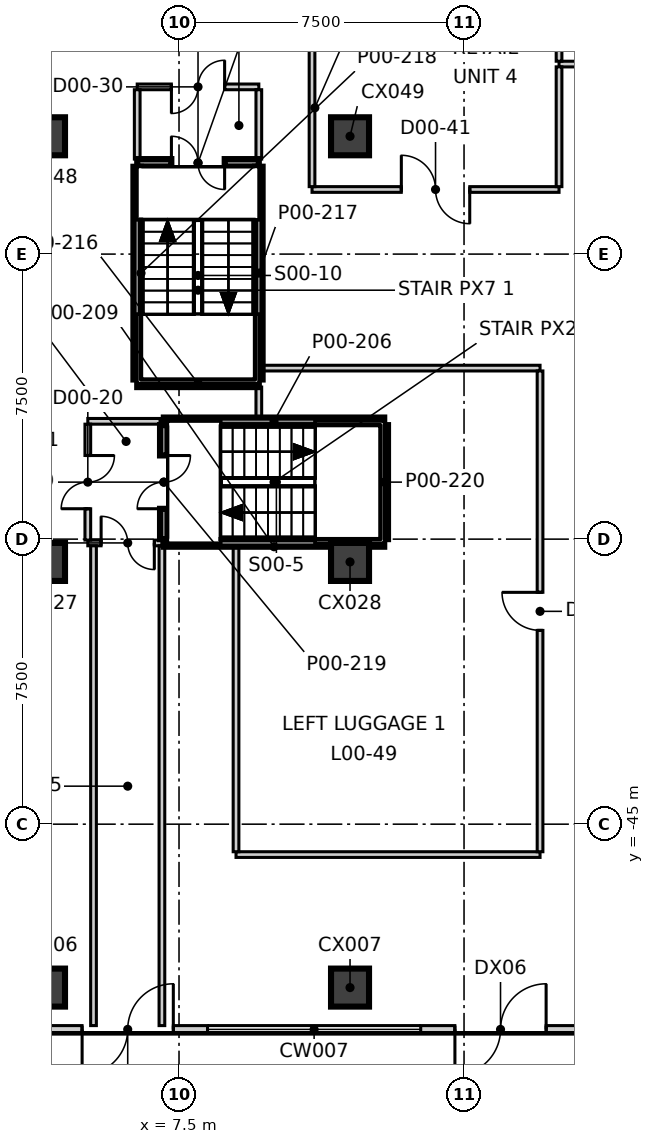
"""IFC4 building model, lengths in metres.
Left out: names, types, materials, properties, quantities, classifications, styles, units other than length and angle.
Written with IfcOpenShell. Run it as: python <this file> out.ifc"""

import sys

from ifc_helpers import new_model, si_unit, direction, frame, frame_2d, origin, origin_2d, place, context, subcontext, project, spatial, rectangle, extrude, element, fill, save


model = new_model("IFC4")
c1 = context("Model", 3, precision=1e-05, world=origin(), true_north=direction((0.0, 1.0)))
c2 = subcontext(c1, "Body", "Model", "MODEL_VIEW")
j1 = project(units=[si_unit("LENGTHUNIT", "METRE"), si_unit("PLANEANGLEUNIT", "RADIAN")], contexts=[c1])
p1 = place(None, origin())
s1 = spatial("IfcSite", under=j1, at=p1, CompositionType="ELEMENT")
p2 = place(p1, origin())
s2 = spatial("IfcBuilding", under=s1, at=p2, CompositionType="ELEMENT")
p3 = place(p2, origin())
s3 = spatial("IfcBuildingStorey", under=s2, at=p3, CompositionType="ELEMENT", Elevation=0.0)
for number, where, z_axis, x_axis in (
    (1, (4.0, -49.3, -0.4), (0.0, 0.0, 1.0), (1.0, 0.0, 0.0)),
    (2, (12.0, -49.3, -0.4), (0.0, 0.0, 1.0), (1.0, 0.0, 0.0)),
    (3, (4.0, -38.1, -0.4), (0.0, 0.0, 1.0), (1.0, 0.0, 0.0)),
    (4, (12.0, -38.1, -0.4), (0.0, 0.0, 1.0), (1.0, 0.0, 0.0)),
    (5, (4.0, -26.9, -0.4), (0.0, 0.0, 1.0), (1.0, 0.0, 0.0)),
    (6, (12.0, -26.9, -0.4), (0.0, 0.0, 1.0), (1.0, 0.0, 0.0)),
):
    element("IfcColumn", number, at=place(p3, frame(where, z_axis=z_axis, x_axis=x_axis)), inside=s3, PredefinedType="COLUMN", context=c2, shape_type="SweptSolid", body=[
        extrude(rectangle(XDim=1.0, YDim=1.0, at=origin_2d()), origin(), (0.0, 0.0, 1.0), 8.5),
    ])
p4 = place(p3, frame((4.05, -50.4, 0.0), z_axis=(0.0, 0.0, 1.0), x_axis=(1.0, 0.0, 0.0)))
e7 = element("IfcWall", 7, at=p4, inside=s3, PredefinedType="ELEMENTEDWALL", context=c2, shape_type="SweptSolid", body=[
    extrude(rectangle(XDim=4.2, YDim=0.2, at=frame_2d((2.1, 0.0))), origin(), (0.0, 0.0, 1.0), 8.1),
])
p5 = place(p4, frame((0.9, 0.0, 0.0)))
e8 = element("IfcOpeningElement", 8, at=p5, cuts=e7, PredefinedType="OPENING", context=c2, shape_type="SweptSolid", body=[
    extrude(rectangle(XDim=2.4, YDim=3.2, at=frame_2d((1.2, 1.6))), frame((0.0, 0.11, 0.0), z_axis=(0.0, -1.0, 0.0), x_axis=(1.0, 0.0, 0.0)), (0.0, 0.0, 1.0), 0.22),
])
p6 = place(p3, frame((13.86, -50.4, 0.0), z_axis=(0.0, 0.0, 1.0), x_axis=(1.0, 0.0, 0.0)))
e9 = element("IfcWall", 9, at=p6, inside=s3, PredefinedType="ELEMENTEDWALL", context=c2, shape_type="SweptSolid", body=[
    extrude(rectangle(XDim=4.2, YDim=0.2, at=frame_2d((2.1, 0.0))), origin(), (0.0, 0.0, 1.0), 8.1),
])
p7 = place(p6, frame((0.9, 0.0, 0.0)))
e10 = element("IfcOpeningElement", 10, at=p7, cuts=e9, PredefinedType="OPENING", context=c2, shape_type="SweptSolid", body=[
    extrude(rectangle(XDim=2.4, YDim=3.2, at=frame_2d((1.2, 1.6))), frame((0.0, 0.11, 0.0), z_axis=(0.0, -1.0, 0.0), x_axis=(1.0, 0.0, 0.0)), (0.0, 0.0, 1.0), 0.22),
])
p8 = place(p3, frame((6.4, -25.6, 0.0), z_axis=(0.0, 0.0, 1.0), x_axis=(1.0, 0.0, 0.0)))
e11 = element("IfcWall", 11, at=p8, inside=s3, PredefinedType="PARTITIONING", context=c2, shape_type="SweptSolid", body=[
    extrude(rectangle(XDim=3.2, YDim=0.15, at=frame_2d((1.6, 0.0))), origin(), (0.0, 0.0, 1.0), 8.1),
])
p9 = place(p8, frame((0.9, 0.0, 0.0)))
e12 = element("IfcOpeningElement", 12, at=p9, cuts=e11, PredefinedType="OPENING", context=c2, shape_type="SweptSolid", body=[
    extrude(rectangle(XDim=1.4, YDim=2.1, at=frame_2d((0.7, 1.05))), frame((0.0, 0.085, 0.0), z_axis=(0.0, -1.0, 0.0), x_axis=(1.0, 0.0, 0.0)), (0.0, 0.0, 1.0), 0.17),
])
p10 = place(p3, frame((5.1, -34.4, 0.0), z_axis=(0.0, 0.0, 1.0), x_axis=(1.0, 0.0, 0.0)))
e13 = element("IfcWall", 13, at=p10, inside=s3, PredefinedType="PARTITIONING", context=c2, shape_type="SweptSolid", body=[
    extrude(rectangle(XDim=1.9, YDim=0.15, at=frame_2d((0.95, 0.0))), origin(), (0.0, 0.0, 1.0), 8.1),
])
p11 = place(p3, frame((5.1, -37.6, 0.0), z_axis=(0.0, 0.0, 1.0), x_axis=(1.0, 0.0, 0.0)))
e14 = element("IfcWall", 14, at=p11, inside=s3, PredefinedType="PARTITIONING", context=c2, shape_type="SweptSolid", body=[
    extrude(rectangle(XDim=1.95, YDim=0.15, at=frame_2d((0.975, 0.0))), origin(), (0.0, 0.0, 1.0), 8.1),
])
p12 = place(p11, frame((0.35, 0.0, 0.0)))
e15 = element("IfcOpeningElement", 15, at=p12, cuts=e14, PredefinedType="OPENING", context=c2, shape_type="SweptSolid", body=[
    extrude(rectangle(XDim=1.4, YDim=2.1, at=frame_2d((0.7, 1.05))), frame((0.0, 0.085, 0.0), z_axis=(0.0, -1.0, 0.0), x_axis=(1.0, 0.0, 0.0)), (0.0, 0.0, 1.0), 0.17),
])
p13 = place(p3, frame((5.1, -37.525, 0.0), z_axis=(0.0, 0.0, 1.0), x_axis=(0.0, 1.0, 0.0)))
e16 = element("IfcWall", 16, at=p13, inside=s3, PredefinedType="PARTITIONING", context=c2, shape_type="SweptSolid", body=[
    extrude(rectangle(XDim=3.05, YDim=0.15, at=frame_2d((1.525, 0.0))), origin(), (0.0, 0.0, 1.0), 8.1),
])
p14 = place(p13, frame((0.825, 0.0, 0.0)))
e17 = element("IfcOpeningElement", 17, at=p14, cuts=e16, PredefinedType="OPENING", context=c2, shape_type="SweptSolid", body=[
    extrude(rectangle(XDim=1.4, YDim=2.1, at=frame_2d((0.7, 1.05))), frame((0.0, 0.085, 0.0), z_axis=(0.0, -1.0, 0.0), x_axis=(1.0, 0.0, 0.0)), (0.0, 0.0, 1.0), 0.17),
])
p15 = place(p3, frame((5.25, -50.3, 0.0), z_axis=(0.0, 0.0, 1.0), x_axis=(0.0, 1.0, 0.0)))
e18 = element("IfcWall", 18, at=p15, inside=s3, PredefinedType="PARTITIONING", context=c2, shape_type="SweptSolid", body=[
    extrude(rectangle(XDim=12.625, YDim=0.15, at=frame_2d((6.312, 0.0))), origin(), (0.0, 0.0, 1.0), 8.1),
])
for number, where, z_axis, x_axis in (
    (19, (6.4, -27.5, 0.0), (0.0, 0.0, 1.0), (0.0, 1.0, 0.0)),
    (20, (9.6, -27.5, 0.0), (0.0, 0.0, 1.0), (0.0, 1.0, 0.0)),
):
    element("IfcWall", number, at=place(p3, frame(where, z_axis=z_axis, x_axis=x_axis)), inside=s3, PredefinedType="PARTITIONING", context=c2, shape_type="SweptSolid", body=[
        extrude(rectangle(XDim=1.825, YDim=0.15, at=frame_2d((0.913, 0.0))), origin(), (0.0, 0.0, 1.0), 8.1),
    ])
p16 = place(p3, frame((7.05, -50.3, 0.0), z_axis=(0.0, 0.0, 1.0), x_axis=(0.0, 1.0, 0.0)))
e21 = element("IfcWall", 21, at=p16, inside=s3, PredefinedType="PARTITIONING", context=c2, shape_type="SweptSolid", body=[
    extrude(rectangle(XDim=12.625, YDim=0.15, at=frame_2d((6.312, 0.0))), origin(), (0.0, 0.0, 1.0), 8.1),
])
p17 = place(p3, frame((17.5, -25.0, 0.0), z_axis=(0.0, 0.0, 1.0), x_axis=(1.0, 0.0, 0.0)))
e22 = element("IfcWall", 22, at=p17, inside=s3, PredefinedType="PARTITIONING", context=c2, shape_type="SweptSolid", body=[
    extrude(rectangle(XDim=3.0, YDim=0.15, at=frame_2d((1.5, 0.0))), origin(), (0.0, 0.0, 1.0), 8.1),
])
p18 = place(p17, frame((0.7, 0.0, 0.0)))
e23 = element("IfcOpeningElement", 23, at=p18, cuts=e22, PredefinedType="OPENING", context=c2, shape_type="SweptSolid", body=[
    extrude(rectangle(XDim=1.6, YDim=2.1, at=frame_2d((0.8, 1.05))), frame((0.0, 0.085, 0.0), z_axis=(0.0, -1.0, 0.0), x_axis=(1.0, 0.0, 0.0)), (0.0, 0.0, 1.0), 0.17),
])
p19 = place(p3, frame((17.5, -24.925, 0.0), z_axis=(0.0, 0.0, 1.0), x_axis=(0.0, 1.0, 0.0)))
e24 = element("IfcWall", 24, at=p19, inside=s3, PredefinedType="PARTITIONING", context=c2, shape_type="SweptSolid", body=[
    extrude(rectangle(XDim=4.85, YDim=0.15, at=frame_2d((2.425, 0.0))), origin(), (0.0, 0.0, 1.0), 8.1),
])
p20 = place(p3, frame((9.7, -33.0, 0.0), z_axis=(0.0, 0.0, 1.0), x_axis=(1.0, 0.0, 0.0)))
e25 = element("IfcWall", 25, at=p20, inside=s3, PredefinedType="PARTITIONING", context=c2, shape_type="SweptSolid", body=[
    extrude(rectangle(XDim=7.3, YDim=0.15, at=frame_2d((3.65, 0.0))), origin(), (0.0, 0.0, 1.0), 8.1),
])
p21 = place(p3, frame((9.0, -45.8, 0.0), z_axis=(0.0, 0.0, 1.0), x_axis=(1.0, 0.0, 0.0)))
e26 = element("IfcWall", 26, at=p21, inside=s3, PredefinedType="PARTITIONING", context=c2, shape_type="SweptSolid", body=[
    extrude(rectangle(XDim=8.0, YDim=0.15, at=frame_2d((4.0, 0.0))), origin(), (0.0, 0.0, 1.0), 8.1),
])
p22 = place(p3, frame((11.0, -28.3, 0.0), z_axis=(0.0, 0.0, 1.0), x_axis=(1.0, 0.0, 0.0)))
e27 = element("IfcWall", 27, at=p22, inside=s3, PredefinedType="PARTITIONING", context=c2, shape_type="SweptSolid", body=[
    extrude(rectangle(XDim=6.5, YDim=0.15, at=frame_2d((3.25, 0.0))), origin(), (0.0, 0.0, 1.0), 8.1),
])
p23 = place(p22, frame((2.35, 0.0, 0.0)))
e28 = element("IfcOpeningElement", 28, at=p23, cuts=e27, PredefinedType="OPENING", context=c2, shape_type="SweptSolid", body=[
    extrude(rectangle(XDim=1.8, YDim=2.1, at=frame_2d((0.9, 1.05))), frame((0.0, 0.085, 0.0), z_axis=(0.0, -1.0, 0.0), x_axis=(1.0, 0.0, 0.0)), (0.0, 0.0, 1.0), 0.17),
])
p24 = place(p3, frame((17.0, -45.725, 0.0), z_axis=(0.0, 0.0, 1.0), x_axis=(0.0, 1.0, 0.0)))
e29 = element("IfcWall", 29, at=p24, inside=s3, PredefinedType="PARTITIONING", context=c2, shape_type="SweptSolid", body=[
    extrude(rectangle(XDim=12.65, YDim=0.15, at=frame_2d((6.325, 0.0))), origin(), (0.0, 0.0, 1.0), 8.1),
])
p25 = place(p24, frame((5.825, 0.0, 0.0)))
e30 = element("IfcOpeningElement", 30, at=p25, cuts=e29, PredefinedType="OPENING", context=c2, shape_type="SweptSolid", body=[
    extrude(rectangle(XDim=1.0, YDim=2.1, at=frame_2d((0.5, 1.05))), frame((0.0, 0.085, 0.0), z_axis=(0.0, -1.0, 0.0), x_axis=(1.0, 0.0, 0.0)), (0.0, 0.0, 1.0), 0.17),
])
p26 = place(p3, frame((9.0, -45.725, 0.0), z_axis=(0.0, 0.0, 1.0), x_axis=(0.0, 1.0, 0.0)))
e31 = element("IfcWall", 31, at=p26, inside=s3, PredefinedType="PARTITIONING", context=c2, shape_type="SweptSolid", body=[
    extrude(rectangle(XDim=8.025, YDim=0.15, at=frame_2d((4.013, 0.0))), origin(), (0.0, 0.0, 1.0), 8.1),
])
p27 = place(p3, frame((9.6, -34.3, 0.0), z_axis=(0.0, 0.0, 1.0), x_axis=(0.0, 1.0, 0.0)))
e32 = element("IfcWall", 32, at=p27, inside=s3, PredefinedType="PARTITIONING", context=c2, shape_type="SweptSolid", body=[
    extrude(rectangle(XDim=0.802, YDim=0.15, at=frame_2d((0.401, 0.0))), origin(), (0.0, 0.0, 1.0), 8.1),
])
p28 = place(p3, frame((17.5, -28.225, 0.0), z_axis=(0.0, 0.0, 1.0), x_axis=(0.0, 1.0, 0.0)))
e33 = element("IfcWall", 33, at=p28, inside=s3, PredefinedType="PARTITIONING", context=c2, shape_type="SweptSolid", body=[
    extrude(rectangle(XDim=3.152, YDim=0.15, at=frame_2d((1.576, 0.0))), origin(), (0.0, 0.0, 1.0), 8.1),
])
p29 = place(p3, frame((11.0, -28.225, 0.0), z_axis=(0.0, 0.0, 1.0), x_axis=(0.0, 1.0, 0.0)))
e34 = element("IfcWall", 34, at=p29, inside=s3, PredefinedType="PARTITIONING", context=c2, shape_type="SweptSolid", body=[
    extrude(rectangle(XDim=4.15, YDim=0.15, at=frame_2d((2.075, 0.0))), origin(), (0.0, 0.0, 1.0), 8.1),
])
for number, where, z_axis, x_axis in (
    (35, (7.1, -34.4, 0.0), (0.0, 0.0, 1.0), (1.0, 0.0, 0.0)),
    (36, (7.1, -37.6, 0.0), (0.0, 0.0, 1.0), (1.0, 0.0, 0.0)),
):
    element("IfcWall", number, at=place(p3, frame(where, z_axis=z_axis, x_axis=x_axis)), inside=s3, PredefinedType="SOLIDWALL", context=c2, shape_type="SweptSolid", body=[
        extrude(rectangle(XDim=5.8, YDim=0.2, at=frame_2d((2.9, 0.0))), origin(), (0.0, 0.0, 1.0), 8.1),
    ])
p30 = place(p3, frame((6.4, -27.6, 0.0), z_axis=(0.0, 0.0, 1.0), x_axis=(1.0, 0.0, 0.0)))
e37 = element("IfcWall", 37, at=p30, inside=s3, PredefinedType="SOLIDWALL", context=c2, shape_type="SweptSolid", body=[
    extrude(rectangle(XDim=3.2, YDim=0.2, at=frame_2d((1.6, 0.0))), origin(), (0.0, 0.0, 1.0), 8.1),
])
p31 = place(p30, frame((0.9, 0.0, 0.0)))
e38 = element("IfcOpeningElement", 38, at=p31, cuts=e37, PredefinedType="OPENING", context=c2, shape_type="SweptSolid", body=[
    extrude(rectangle(XDim=1.4, YDim=2.1, at=frame_2d((0.7, 1.05))), frame((0.0, 0.11, 0.0), z_axis=(0.0, -1.0, 0.0), x_axis=(1.0, 0.0, 0.0)), (0.0, 0.0, 1.0), 0.22),
])
p32 = place(p3, frame((6.4, -33.4, 0.0), z_axis=(0.0, 0.0, 1.0), x_axis=(1.0, 0.0, 0.0)))
e39 = element("IfcWall", 39, at=p32, inside=s3, PredefinedType="SOLIDWALL", context=c2, shape_type="SweptSolid", body=[
    extrude(rectangle(XDim=3.2, YDim=0.2, at=frame_2d((1.6, 0.0))), origin(), (0.0, 0.0, 1.0), 8.1),
])
p33 = place(p3, frame((9.6, -33.3, 0.0), z_axis=(0.0, 0.0, 1.0), x_axis=(0.0, 1.0, 0.0)))
e40 = element("IfcWall", 40, at=p33, inside=s3, PredefinedType="SOLIDWALL", context=c2, shape_type="SweptSolid", body=[
    extrude(rectangle(XDim=5.6, YDim=0.2, at=frame_2d((2.8, 0.0))), origin(), (0.0, 0.0, 1.0), 8.1),
])
p34 = place(p3, frame((6.4, -33.3, 0.0), z_axis=(0.0, 0.0, 1.0), x_axis=(0.0, 1.0, 0.0)))
e41 = element("IfcWall", 41, at=p34, inside=s3, PredefinedType="SOLIDWALL", context=c2, shape_type="SweptSolid", body=[
    extrude(rectangle(XDim=5.598, YDim=0.2, at=frame_2d((2.799, 0.0))), origin(), (0.0, 0.0, 1.0), 8.1),
])
p35 = place(p3, frame((7.1, -37.5, 0.0), z_axis=(0.0, 0.0, 1.0), x_axis=(0.0, 1.0, 0.0)))
e42 = element("IfcWall", 42, at=p35, inside=s3, PredefinedType="SOLIDWALL", context=c2, shape_type="SweptSolid", body=[
    extrude(rectangle(XDim=3.0, YDim=0.2, at=frame_2d((1.5, 0.0))), origin(), (0.0, 0.0, 1.0), 8.1),
])
p36 = place(p35, frame((0.8, 0.0, 0.0)))
e43 = element("IfcOpeningElement", 43, at=p36, cuts=e42, PredefinedType="OPENING", context=c2, shape_type="SweptSolid", body=[
    extrude(rectangle(XDim=1.4, YDim=2.1, at=frame_2d((0.7, 1.05))), frame((0.0, 0.11, 0.0), z_axis=(0.0, -1.0, 0.0), x_axis=(1.0, 0.0, 0.0)), (0.0, 0.0, 1.0), 0.22),
])
p37 = place(p3, frame((12.9, -37.5, 0.0), z_axis=(0.0, 0.0, 1.0), x_axis=(0.0, 1.0, 0.0)))
e44 = element("IfcWall", 44, at=p37, inside=s3, PredefinedType="SOLIDWALL", context=c2, shape_type="SweptSolid", body=[
    extrude(rectangle(XDim=3.0, YDim=0.2, at=frame_2d((1.5, 0.0))), origin(), (0.0, 0.0, 1.0), 8.1),
])
p38 = place(p5, frame((2.4, 0.0, 0.0), z_axis=(0.0, 0.0, 1.0), x_axis=(-1.0, 0.0, 0.0)))
e45 = element("IfcDoor", 45, at=p38, inside=s3, OperationType="DOUBLE_DOOR_SINGLE_SWING", PredefinedType="DOOR", context=c2, shape_type="SweptSolid", body=[
    extrude(rectangle(XDim=2.4, YDim=3.2, at=frame_2d((1.2, 1.6))), frame((0.0, 0.025, 0.0), z_axis=(0.0, -1.0, 0.0), x_axis=(1.0, 0.0, 0.0)), (0.0, 0.0, 1.0), 0.05),
])
fill(e8, e45)
p39 = place(p7, frame((2.4, 0.0, 0.0), z_axis=(0.0, 0.0, 1.0), x_axis=(-1.0, 0.0, 0.0)))
e46 = element("IfcDoor", 46, at=p39, inside=s3, OperationType="DOUBLE_DOOR_SINGLE_SWING", PredefinedType="DOOR", context=c2, shape_type="SweptSolid", body=[
    extrude(rectangle(XDim=2.4, YDim=3.2, at=frame_2d((1.2, 1.6))), frame((0.0, 0.025, 0.0), z_axis=(0.0, -1.0, 0.0), x_axis=(1.0, 0.0, 0.0)), (0.0, 0.0, 1.0), 0.05),
])
fill(e10, e46)
p40 = place(p36, origin())
e47 = element("IfcDoor", 47, at=p40, inside=s3, OperationType="DOUBLE_DOOR_SINGLE_SWING", PredefinedType="DOOR", context=c2, shape_type="SweptSolid", body=[
    extrude(rectangle(XDim=1.4, YDim=2.1, at=frame_2d((0.7, 1.05))), frame((0.0, 0.025, 0.0), z_axis=(0.0, -1.0, 0.0), x_axis=(1.0, 0.0, 0.0)), (0.0, 0.0, 1.0), 0.05),
])
fill(e43, e47)
p41 = place(p14, origin())
e48 = element("IfcDoor", 48, at=p41, inside=s3, OperationType="DOUBLE_DOOR_SINGLE_SWING", PredefinedType="DOOR", context=c2, shape_type="SweptSolid", body=[
    extrude(rectangle(XDim=1.4, YDim=2.1, at=frame_2d((0.7, 1.05))), frame((0.0, 0.025, 0.0), z_axis=(0.0, -1.0, 0.0), x_axis=(1.0, 0.0, 0.0)), (0.0, 0.0, 1.0), 0.05),
])
fill(e17, e48)
p42 = place(p31, origin())
e49 = element("IfcDoor", 49, at=p42, inside=s3, OperationType="DOUBLE_DOOR_SINGLE_SWING", PredefinedType="DOOR", context=c2, shape_type="SweptSolid", body=[
    extrude(rectangle(XDim=1.4, YDim=2.1, at=frame_2d((0.7, 1.05))), frame((0.0, 0.025, 0.0), z_axis=(0.0, -1.0, 0.0), x_axis=(1.0, 0.0, 0.0)), (0.0, 0.0, 1.0), 0.05),
])
fill(e38, e49)
p43 = place(p9, origin())
e50 = element("IfcDoor", 50, at=p43, inside=s3, OperationType="DOUBLE_DOOR_SINGLE_SWING", PredefinedType="DOOR", context=c2, shape_type="SweptSolid", body=[
    extrude(rectangle(XDim=1.4, YDim=2.1, at=frame_2d((0.7, 1.05))), frame((0.0, 0.025, 0.0), z_axis=(0.0, -1.0, 0.0), x_axis=(1.0, 0.0, 0.0)), (0.0, 0.0, 1.0), 0.05),
])
fill(e12, e50)
p44 = place(p25, origin())
e51 = element("IfcDoor", 51, at=p44, inside=s3, OperationType="SINGLE_SWING_LEFT", PredefinedType="DOOR", context=c2, shape_type="SweptSolid", body=[
    extrude(rectangle(XDim=1.0, YDim=2.1, at=frame_2d((0.5, 1.05))), frame((0.0, 0.025, 0.0), z_axis=(0.0, -1.0, 0.0), x_axis=(1.0, 0.0, 0.0)), (0.0, 0.0, 1.0), 0.05),
])
fill(e30, e51)
p45 = place(p23, origin())
e52 = element("IfcDoor", 52, at=p45, inside=s3, OperationType="DOUBLE_DOOR_SINGLE_SWING", PredefinedType="DOOR", context=c2, shape_type="SweptSolid", body=[
    extrude(rectangle(XDim=1.8, YDim=2.1, at=frame_2d((0.9, 1.05))), frame((0.0, 0.025, 0.0), z_axis=(0.0, -1.0, 0.0), x_axis=(1.0, 0.0, 0.0)), (0.0, 0.0, 1.0), 0.05),
])
fill(e28, e52)
p46 = place(p12, origin())
e53 = element("IfcDoor", 53, at=p46, inside=s3, OperationType="DOUBLE_DOOR_SINGLE_SWING", PredefinedType="DOOR", context=c2, shape_type="SweptSolid", body=[
    extrude(rectangle(XDim=1.4, YDim=2.1, at=frame_2d((0.7, 1.05))), frame((0.0, 0.025, 0.0), z_axis=(0.0, -1.0, 0.0), x_axis=(1.0, 0.0, 0.0)), (0.0, 0.0, 1.0), 0.05),
])
fill(e15, e53)
save(model, sys.argv[1])
